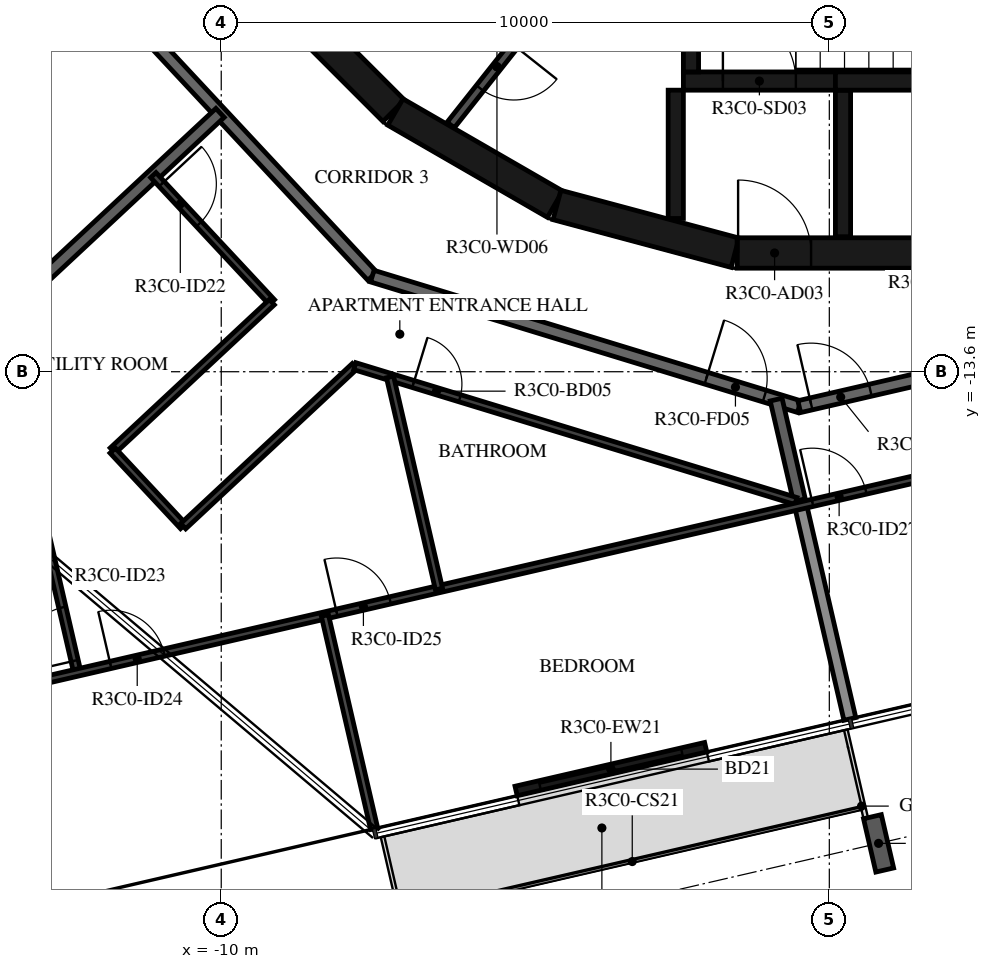
"""IFC4 building model, lengths in metres.
Left out: names, types, materials, properties, quantities, classifications, styles, units other than length and angle.
Written with IfcOpenShell. Run it as: python <this file> out.ifc"""

import sys

from ifc_helpers import new_model, si_unit, direction, frame, frame_2d, origin, origin_2d, place, context, subcontext, project, spatial, rectangle, i_section, extrude, element, fill, save


model = new_model("IFC4")
c1 = context("Model", 3, precision=1e-05, world=origin(), true_north=direction((0.0, 1.0)))
c2 = subcontext(c1, "Body", "Model", "MODEL_VIEW")
j1 = project(units=[si_unit("LENGTHUNIT", "METRE"), si_unit("PLANEANGLEUNIT", "RADIAN")], contexts=[c1])
p1 = place(None, origin())
s1 = spatial("IfcSite", under=j1, at=p1, CompositionType="ELEMENT")
p2 = place(p1, origin())
s2 = spatial("IfcBuilding", under=s1, at=p2, CompositionType="ELEMENT")
p3 = place(p2, frame((0.0, 0.0, 134.4)))
s3 = spatial("IfcBuildingStorey", under=s2, at=p3, CompositionType="ELEMENT", Elevation=134.4)
p4 = place(p3, frame((0.81, -21.356, -0.38), z_axis=(0.0, 0.0, 1.0), x_axis=(-0.974370073419, -0.224951016948, 0.0)))
e1 = element("IfcColumn", 1, at=p4, inside=s3, PredefinedType="COLUMN", context=c2, shape_type="SweptSolid", body=[
    extrude(i_section(OverallWidth=0.3, OverallDepth=0.9, WebThickness=0.019, FlangeThickness=0.035, FilletRadius=0.03, at=origin_2d()), origin(), (0.0, 0.0, 1.0), 3.5),
])
p5 = place(p3, frame((-5.151, -20.495, 0.0), z_axis=(0.0, 0.0, 1.0), x_axis=(0.974377048991, 0.224920800284, 0.0)))
e2 = element("IfcWall", 2, at=p5, inside=s3, PredefinedType="STANDARD", context=c2, shape_type="SweptSolid", body=[
    extrude(rectangle(XDim=3.2, YDim=0.16, at=frame_2d((1.6, 0.0))), origin(), (0.0, 0.0, 1.0), 3.12),
])
p6 = place(p5, frame((0.4, 0.0, 0.0)))
e3 = element("IfcOpeningElement", 3, at=p6, cuts=e2, PredefinedType="OPENING", context=c2, shape_type="SweptSolid", body=[
    extrude(rectangle(XDim=2.4, YDim=2.4, at=frame_2d((1.2, 1.2))), frame((0.0, 0.09, 0.0), z_axis=(0.0, -1.0, 0.0), x_axis=(1.0, 0.0, 0.0)), (0.0, 0.0, 1.0), 0.18),
])
p7 = place(p3, frame((-9.308, -7.164, 0.0), z_axis=(0.0, 0.0, 1.0), x_axis=(0.707106781187, -0.707106781187, 0.0)))
e4 = element("IfcWall", 4, at=p7, inside=s3, PredefinedType="SHEAR", context=c2, shape_type="SweptSolid", body=[
    extrude(rectangle(XDim=3.032, YDim=0.5, at=frame_2d((1.516, 0.0))), origin(), (0.0, 0.0, 1.0), 3.12),
])
for number, where, z_axis, x_axis in (
    (5, (-7.137, -9.329, 0.0), (0.0, 0.0, 1.0), (0.866, -0.5, 0.0)),
    (6, (-4.479, -10.858, 0.0), (0.0, 0.0, 1.0), (0.966, -0.259, 0.0)),
):
    element("IfcWall", number, at=place(p3, frame(where, z_axis=z_axis, x_axis=x_axis)), inside=s3, PredefinedType="SHEAR", context=c2, shape_type="SweptSolid", body=[
        extrude(rectangle(XDim=3.033, YDim=0.5, at=frame_2d((1.516, 0.0))), origin(), (0.0, 0.0, 1.0), 3.12),
    ])
p8 = place(p3, frame((-1.516, -11.647, 0.0), z_axis=(0.0, 0.0, 1.0), x_axis=(1.0, 0.0, 0.0)))
e7 = element("IfcWall", 7, at=p8, inside=s3, PredefinedType="SHEAR", context=c2, shape_type="SweptSolid", body=[
    extrude(rectangle(XDim=3.033, YDim=0.5, at=frame_2d((1.516, 0.0))), origin(), (0.0, 0.0, 1.0), 3.12),
])
p9 = place(p8, frame((0.016, 0.0, 0.0)))
e8 = element("IfcOpeningElement", 8, at=p9, cuts=e7, PredefinedType="OPENING", context=c2, shape_type="SweptSolid", body=[
    extrude(rectangle(XDim=1.2, YDim=2.1, at=frame_2d((0.6, 1.05))), frame((0.0, 0.26, 0.0), z_axis=(0.0, -1.0, 0.0), x_axis=(1.0, 0.0, 0.0)), (0.0, 0.0, 1.0), 0.52),
])
p10 = place(p3, frame((-2.275, -8.67, 0.0), z_axis=(0.0, 0.0, 1.0), x_axis=(0.0, 1.0, 0.0)))
e9 = element("IfcWall", 9, at=p10, inside=s3, PredefinedType="SHEAR", context=c2, shape_type="SweptSolid", body=[
    extrude(rectangle(XDim=3.32, YDim=0.25, at=frame_2d((1.66, 0.0))), origin(), (0.0, 0.0, 1.0), 3.12),
])
p11 = place(p3, frame((0.1, -8.82, 0.0), z_axis=(0.0, 0.0, 1.0), x_axis=(1.0, 0.0, 0.0)))
e10 = element("IfcWall", 10, at=p11, inside=s3, PredefinedType="SHEAR", context=c2, shape_type="SweptSolid", body=[
    extrude(rectangle(XDim=4.55, YDim=0.3, at=frame_2d((2.275, 0.0))), origin(), (0.0, 0.0, 1.0), 3.12),
])
p12 = place(p3, frame((-2.4, -8.82, 0.0), z_axis=(0.0, 0.0, 1.0), x_axis=(1.0, 0.0, 0.0)))
e11 = element("IfcWall", 11, at=p12, inside=s3, PredefinedType="SHEAR", context=c2, shape_type="SweptSolid", body=[
    extrude(rectangle(XDim=2.5, YDim=0.3, at=frame_2d((1.25, 0.0))), origin(), (0.0, 0.0, 1.0), 3.12),
])
p13 = place(p12, frame((0.65, 0.0, 0.0)))
e12 = element("IfcOpeningElement", 12, at=p13, cuts=e11, PredefinedType="OPENING", context=c2, shape_type="SweptSolid", body=[
    extrude(rectangle(XDim=1.2, YDim=2.1, at=frame_2d((0.6, 1.05))), frame((0.0, 0.16, 0.0), z_axis=(0.0, -1.0, 0.0), x_axis=(1.0, 0.0, 0.0)), (0.0, 0.0, 1.0), 0.32),
])
p14 = place(p3, frame((-2.525, -8.97, 0.0), z_axis=(0.0, 0.0, 1.0), x_axis=(0.0, -1.0, 0.0)))
e13 = element("IfcWall", 13, at=p14, inside=s3, PredefinedType="SHEAR", context=c2, shape_type="SweptSolid", body=[
    extrude(rectangle(XDim=2.11, YDim=0.25, at=frame_2d((1.055, 0.0))), origin(), (0.0, 0.0, 1.0), 3.12),
])
p15 = place(p3, frame((0.225, -8.97, 0.0), z_axis=(0.0, 0.0, 1.0), x_axis=(0.0, -1.0, 0.0)))
e14 = element("IfcWall", 14, at=p15, inside=s3, PredefinedType="SHEAR", context=c2, shape_type="SweptSolid", body=[
    extrude(rectangle(XDim=2.41, YDim=0.25, at=frame_2d((1.205, 0.0))), origin(), (0.0, 0.0, 1.0), 3.12),
])
p16 = place(p3, frame((-4.706, -7.625, 0.0), z_axis=(0.0, 0.0, 1.0), x_axis=(-0.621392599334, -0.783499353856, 0.0)))
e15 = element("IfcWall", 15, at=p16, inside=s3, PredefinedType="PARTITIONING", context=c2, shape_type="SweptSolid", body=[
    extrude(rectangle(XDim=2.447, YDim=0.15, at=frame_2d((1.224, 0.0))), origin(), (0.0, 0.0, 1.0), 3.12),
])
p17 = place(p16, frame((0.774, 0.0, 0.0)))
e16 = element("IfcOpeningElement", 16, at=p17, cuts=e15, PredefinedType="OPENING", context=c2, shape_type="SweptSolid", body=[
    extrude(rectangle(XDim=0.9, YDim=2.1, at=frame_2d((0.45, 1.05))), frame((0.0, 0.085, 0.0), z_axis=(0.0, -1.0, 0.0), x_axis=(1.0, 0.0, 0.0)), (0.0, 0.0, 1.0), 0.17),
])
p18 = place(p3, frame((-12.523, -6.659, 0.0), z_axis=(0.0, 0.0, 1.0), x_axis=(0.682001841105, -0.731350455479, 0.0)))
e17 = element("IfcWall", 17, at=p18, inside=s3, PredefinedType="STANDARD", context=c2, shape_type="SweptSolid", body=[
    extrude(rectangle(XDim=7.342, YDim=0.2, at=frame_2d((3.671, 0.0))), origin(), (0.0, 0.0, 1.0), 3.12),
])
p19 = place(p3, frame((-7.516, -12.028, 0.0), z_axis=(0.0, 0.0, 1.0), x_axis=(0.956306642771, -0.292365533182, 0.0)))
e18 = element("IfcWall", 18, at=p19, inside=s3, PredefinedType="STANDARD", context=c2, shape_type="SweptSolid", body=[
    extrude(rectangle(XDim=7.342, YDim=0.2, at=frame_2d((3.671, 0.0))), origin(), (0.0, 0.0, 1.0), 3.12),
])
p20 = place(p19, frame((5.745, 0.0, 0.0)))
e19 = element("IfcOpeningElement", 19, at=p20, cuts=e18, PredefinedType="OPENING", context=c2, shape_type="SweptSolid", body=[
    extrude(rectangle(XDim=1.0, YDim=2.1, at=frame_2d((0.5, 1.05))), frame((0.0, 0.11, 0.0), z_axis=(0.0, -1.0, 0.0), x_axis=(1.0, 0.0, 0.0)), (0.0, 0.0, 1.0), 0.22),
])
p21 = place(p3, frame((-0.495, -14.175, 0.0), z_axis=(0.0, 0.0, 1.0), x_axis=(0.974376622151, 0.224922649383, 0.0)))
e20 = element("IfcWall", 20, at=p21, inside=s3, PredefinedType="STANDARD", context=c2, shape_type="SweptSolid", body=[
    extrude(rectangle(XDim=7.342, YDim=0.2, at=frame_2d((3.671, 0.0))), origin(), (0.0, 0.0, 1.0), 3.12),
])
p22 = place(p21, frame((0.2, 0.0, 0.0)))
e21 = element("IfcOpeningElement", 21, at=p22, cuts=e20, PredefinedType="OPENING", context=c2, shape_type="SweptSolid", body=[
    extrude(rectangle(XDim=1.0, YDim=2.1, at=frame_2d((0.5, 1.05))), frame((0.0, 0.11, 0.0), z_axis=(0.0, -1.0, 0.0), x_axis=(1.0, 0.0, 0.0)), (0.0, 0.0, 1.0), 0.22),
])
p23 = place(p3, frame((-13.699, -12.774, 0.0), z_axis=(0.0, 0.0, 1.0), x_axis=(0.731353758457, 0.681998299111, 0.0)))
e22 = element("IfcWall", 22, at=p23, inside=s3, PredefinedType="STANDARD", context=c2, shape_type="SweptSolid", body=[
    extrude(rectangle(XDim=5.031, YDim=0.2, at=frame_2d((2.515, 0.0))), origin(), (0.0, 0.0, 1.0), 3.12),
])
p24 = place(p3, frame((-0.492, -15.713, 0.0), z_axis=(0.0, 0.0, 1.0), x_axis=(-0.224974992875, 0.97436453783, 0.0)))
e23 = element("IfcWall", 23, at=p24, inside=s3, PredefinedType="STANDARD", context=c2, shape_type="SweptSolid", body=[
    extrude(rectangle(XDim=1.698, YDim=0.2, at=frame_2d((0.849, 0.0))), origin(), (0.0, 0.0, 1.0), 3.12),
])
p25 = place(p3, frame((0.338, -19.31, 0.0), z_axis=(0.0, 0.0, 1.0), x_axis=(-0.224943703639, 0.9743717618, 0.0)))
e24 = element("IfcWall", 24, at=p25, inside=s3, PredefinedType="STANDARD", context=c2, shape_type="SweptSolid", body=[
    extrude(rectangle(XDim=3.6, YDim=0.2, at=frame_2d((1.8, 0.0))), origin(), (0.0, 0.0, 1.0), 2.73),
])
p26 = place(p3, frame((-11.117, -10.366, 0.0), z_axis=(0.0, 0.0, 1.0), x_axis=(0.682029016154, -0.73132511315, 0.0)))
e25 = element("IfcWall", 25, at=p26, inside=s3, PredefinedType="PARTITIONING", context=c2, shape_type="SweptSolid", body=[
    extrude(rectangle(XDim=2.858, YDim=0.12, at=frame_2d((1.429, 0.0))), origin(), (0.0, 0.0, 1.0), 3.12),
])
p27 = place(p26, frame((0.2, 0.0, 0.0)))
e26 = element("IfcOpeningElement", 26, at=p27, cuts=e25, PredefinedType="OPENING", context=c2, shape_type="SweptSolid", body=[
    extrude(rectangle(XDim=0.9, YDim=2.1, at=frame_2d((0.45, 1.05))), frame((0.0, 0.07, 0.0), z_axis=(0.0, -1.0, 0.0), x_axis=(1.0, 0.0, 0.0)), (0.0, 0.0, 1.0), 0.14),
])
p28 = place(p3, frame((-9.168, -12.456, 0.0), z_axis=(0.0, 0.0, 1.0), x_axis=(-0.731372816465, -0.681977861324, 0.0)))
e27 = element("IfcWall", 27, at=p28, inside=s3, PredefinedType="PARTITIONING", context=c2, shape_type="SweptSolid", body=[
    extrude(rectangle(XDim=3.578, YDim=0.12, at=frame_2d((1.789, 0.0))), origin(), (0.0, 0.0, 1.0), 3.12),
])
p29 = place(p3, frame((-11.785, -14.897, 0.0), z_axis=(0.0, 0.0, 1.0), x_axis=(0.681975367709, -0.73137514166, 0.0)))
e28 = element("IfcWall", 28, at=p29, inside=s3, PredefinedType="PARTITIONING", context=c2, shape_type="SweptSolid", body=[
    extrude(rectangle(XDim=1.7, YDim=0.12, at=frame_2d((0.85, 0.0))), origin(), (0.0, 0.0, 1.0), 3.12),
])
p30 = place(p3, frame((-10.625, -16.14, 0.0), z_axis=(0.0, 0.0, 1.0), x_axis=(0.73135399721, 0.68199804308, 0.0)))
e29 = element("IfcWall", 29, at=p30, inside=s3, PredefinedType="PARTITIONING", context=c2, shape_type="SweptSolid", body=[
    extrude(rectangle(XDim=3.858, YDim=0.12, at=frame_2d((1.929, 0.0))), origin(), (0.0, 0.0, 1.0), 3.12),
])
p31 = place(p3, frame((-7.804, -13.509, 0.0), z_axis=(0.0, 0.0, 1.0), x_axis=(0.956309088343, -0.292357533772, 0.0)))
e30 = element("IfcWall", 30, at=p31, inside=s3, PredefinedType="PARTITIONING", context=c2, shape_type="SweptSolid", body=[
    extrude(rectangle(XDim=7.586, YDim=0.12, at=frame_2d((3.793, 0.0))), origin(), (0.0, 0.0, 1.0), 3.12),
])
p32 = place(p31, frame((1.006, 0.0, 0.0)))
e31 = element("IfcOpeningElement", 31, at=p32, cuts=e30, PredefinedType="OPENING", context=c2, shape_type="SweptSolid", body=[
    extrude(rectangle(XDim=0.8, YDim=2.1, at=frame_2d((0.4, 1.05))), frame((0.0, 0.07, 0.0), z_axis=(0.0, -1.0, 0.0), x_axis=(1.0, 0.0, 0.0)), (0.0, 0.0, 1.0), 0.14),
])
p33 = place(p3, frame((-12.366, -18.548, 0.0), z_axis=(0.0, 0.0, 1.0), x_axis=(-0.224958805164, 0.974368275335, 0.0)))
e32 = element("IfcWall", 32, at=p33, inside=s3, PredefinedType="PARTITIONING", context=c2, shape_type="SweptSolid", body=[
    extrude(rectangle(XDim=5.926, YDim=0.12, at=frame_2d((2.963, 0.0))), origin(), (0.0, 0.0, 1.0), 3.12),
])
p34 = place(p33, frame((0.2, 0.0, 0.0)))
e33 = element("IfcOpeningElement", 33, at=p34, cuts=e32, PredefinedType="OPENING", context=c2, shape_type="SweptSolid", body=[
    extrude(rectangle(XDim=0.9, YDim=2.1, at=frame_2d((0.45, 1.05))), frame((0.0, 0.07, 0.0), z_axis=(0.0, -1.0, 0.0), x_axis=(1.0, 0.0, 0.0)), (0.0, 0.0, 1.0), 0.14),
])
p35 = place(p3, frame((-14.736, -19.095, 0.0), z_axis=(0.0, 0.0, 1.0), x_axis=(0.974368335243, 0.224958545682, 0.0)))
e34 = element("IfcWall", 34, at=p35, inside=s3, PredefinedType="PARTITIONING", context=c2, shape_type="SweptSolid", body=[
    extrude(rectangle(XDim=19.263, YDim=0.12, at=frame_2d((9.632, 0.0))), origin(), (0.0, 0.0, 1.0), 3.12),
])
p36 = place(p35, frame((2.993, 0.0, 0.0)))
e35 = element("IfcOpeningElement", 35, at=p36, cuts=e34, PredefinedType="OPENING", context=c2, shape_type="SweptSolid", body=[
    extrude(rectangle(XDim=0.9, YDim=2.1, at=frame_2d((0.45, 1.05))), frame((0.0, 0.07, 0.0), z_axis=(0.0, -1.0, 0.0), x_axis=(1.0, 0.0, 0.0)), (0.0, 0.0, 1.0), 0.14),
])
p37 = place(p35, frame((6.81, 0.0, 0.0)))
e36 = element("IfcOpeningElement", 36, at=p37, cuts=e34, PredefinedType="OPENING", context=c2, shape_type="SweptSolid", body=[
    extrude(rectangle(XDim=0.9, YDim=2.1, at=frame_2d((0.45, 1.05))), frame((0.0, 0.07, 0.0), z_axis=(0.0, -1.0, 0.0), x_axis=(1.0, 0.0, 0.0)), (0.0, 0.0, 1.0), 0.14),
])
p38 = place(p35, frame((0.2, 0.0, 0.0)))
e37 = element("IfcOpeningElement", 37, at=p38, cuts=e34, PredefinedType="OPENING", context=c2, shape_type="SweptSolid", body=[
    extrude(rectangle(XDim=0.9, YDim=2.1, at=frame_2d((0.45, 1.05))), frame((0.0, 0.07, 0.0), z_axis=(0.0, -1.0, 0.0), x_axis=(1.0, 0.0, 0.0)), (0.0, 0.0, 1.0), 0.14),
])
p39 = place(p35, frame((14.839, 0.0, 0.0)))
e38 = element("IfcOpeningElement", 38, at=p39, cuts=e34, PredefinedType="OPENING", context=c2, shape_type="SweptSolid", body=[
    extrude(rectangle(XDim=0.9, YDim=2.1, at=frame_2d((0.45, 1.05))), frame((0.0, 0.07, 0.0), z_axis=(0.0, -1.0, 0.0), x_axis=(1.0, 0.0, 0.0)), (0.0, 0.0, 1.0), 0.14),
])
p40 = place(p3, frame((-6.419, -17.175, 0.0), z_axis=(0.0, 0.0, 1.0), x_axis=(-0.224979003559, 0.974363611778, 0.0)))
e39 = element("IfcWall", 39, at=p40, inside=s3, PredefinedType="PARTITIONING", context=c2, shape_type="SweptSolid", body=[
    extrude(rectangle(XDim=3.581, YDim=0.12, at=frame_2d((1.791, 0.0))), origin(), (0.0, 0.0, 1.0), 3.12),
])
p41 = place(p3, frame((-7.486, -21.116, 0.0), z_axis=(0.0, 0.0, 1.0), x_axis=(-0.224943703639, 0.9743717618, 0.0)))
e40 = element("IfcWall", 40, at=p41, inside=s3, PredefinedType="PARTITIONING", context=c2, shape_type="SweptSolid", body=[
    extrude(rectangle(XDim=3.6, YDim=0.12, at=frame_2d((1.8, 0.0))), origin(), (0.0, 0.0, 1.0), 2.73),
])
p42 = place(p6, origin())
e41 = element("IfcDoor", 41, at=p42, inside=s3, OperationType="DOUBLE_DOOR_SLIDING", PredefinedType="DOOR", context=c2, shape_type="SweptSolid", body=[
    extrude(rectangle(XDim=2.4, YDim=2.4, at=frame_2d((1.2, 1.2))), frame((0.0, 0.025, 0.0), z_axis=(0.0, -1.0, 0.0), x_axis=(1.0, 0.0, 0.0)), (0.0, 0.0, 1.0), 0.05),
])
fill(e3, e41)
p43 = place(p13, origin())
e42 = element("IfcDoor", 42, at=p43, inside=s3, OperationType="SINGLE_SWING_LEFT", PredefinedType="DOOR", context=c2, shape_type="SweptSolid", body=[
    extrude(rectangle(XDim=1.2, YDim=2.1, at=frame_2d((0.6, 1.05))), frame((0.0, 0.025, 0.0), z_axis=(0.0, -1.0, 0.0), x_axis=(1.0, 0.0, 0.0)), (0.0, 0.0, 1.0), 0.05),
])
fill(e12, e42)
p44 = place(p9, origin())
e43 = element("IfcDoor", 43, at=p44, inside=s3, OperationType="SINGLE_SWING_RIGHT", PredefinedType="DOOR", context=c2, shape_type="SweptSolid", body=[
    extrude(rectangle(XDim=1.2, YDim=2.1, at=frame_2d((0.6, 1.05))), frame((0.0, 0.025, 0.0), z_axis=(0.0, -1.0, 0.0), x_axis=(1.0, 0.0, 0.0)), (0.0, 0.0, 1.0), 0.05),
])
fill(e8, e43)
p45 = place(p17, origin())
e44 = element("IfcDoor", 44, at=p45, inside=s3, OperationType="SINGLE_SWING_LEFT", PredefinedType="DOOR", context=c2, shape_type="SweptSolid", body=[
    extrude(rectangle(XDim=0.9, YDim=2.1, at=frame_2d((0.45, 1.05))), frame((0.0, 0.025, 0.0), z_axis=(0.0, -1.0, 0.0), x_axis=(1.0, 0.0, 0.0)), (0.0, 0.0, 1.0), 0.05),
])
fill(e16, e44)
p46 = place(p20, origin())
e45 = element("IfcDoor", 45, at=p46, inside=s3, OperationType="SINGLE_SWING_LEFT", PredefinedType="DOOR", context=c2, shape_type="SweptSolid", body=[
    extrude(rectangle(XDim=1.0, YDim=2.1, at=frame_2d((0.5, 1.05))), frame((0.0, 0.025, 0.0), z_axis=(0.0, -1.0, 0.0), x_axis=(1.0, 0.0, 0.0)), (0.0, 0.0, 1.0), 0.05),
])
fill(e19, e45)
p47 = place(p27, origin())
e46 = element("IfcDoor", 46, at=p47, inside=s3, OperationType="SINGLE_SWING_LEFT", PredefinedType="DOOR", context=c2, shape_type="SweptSolid", body=[
    extrude(rectangle(XDim=0.9, YDim=2.1, at=frame_2d((0.45, 1.05))), frame((0.0, 0.025, 0.0), z_axis=(0.0, -1.0, 0.0), x_axis=(1.0, 0.0, 0.0)), (0.0, 0.0, 1.0), 0.05),
])
fill(e26, e46)
p48 = place(p32, origin())
e47 = element("IfcDoor", 47, at=p48, inside=s3, OperationType="SINGLE_SWING_LEFT", PredefinedType="DOOR", context=c2, shape_type="SweptSolid", body=[
    extrude(rectangle(XDim=0.8, YDim=2.1, at=frame_2d((0.4, 1.05))), frame((0.0, 0.025, 0.0), z_axis=(0.0, -1.0, 0.0), x_axis=(1.0, 0.0, 0.0)), (0.0, 0.0, 1.0), 0.05),
])
fill(e31, e47)
p49 = place(p34, origin())
e48 = element("IfcDoor", 48, at=p49, inside=s3, OperationType="SINGLE_SWING_LEFT", PredefinedType="DOOR", context=c2, shape_type="SweptSolid", body=[
    extrude(rectangle(XDim=0.9, YDim=2.1, at=frame_2d((0.45, 1.05))), frame((0.0, 0.025, 0.0), z_axis=(0.0, -1.0, 0.0), x_axis=(1.0, 0.0, 0.0)), (0.0, 0.0, 1.0), 0.05),
])
fill(e33, e48)
p50 = place(p36, origin())
e49 = element("IfcDoor", 49, at=p50, inside=s3, OperationType="SINGLE_SWING_LEFT", PredefinedType="DOOR", context=c2, shape_type="SweptSolid", body=[
    extrude(rectangle(XDim=0.9, YDim=2.1, at=frame_2d((0.45, 1.05))), frame((0.0, 0.025, 0.0), z_axis=(0.0, -1.0, 0.0), x_axis=(1.0, 0.0, 0.0)), (0.0, 0.0, 1.0), 0.05),
])
fill(e35, e49)
p51 = place(p37, origin())
e50 = element("IfcDoor", 50, at=p51, inside=s3, OperationType="SINGLE_SWING_LEFT", PredefinedType="DOOR", context=c2, shape_type="SweptSolid", body=[
    extrude(rectangle(XDim=0.9, YDim=2.1, at=frame_2d((0.45, 1.05))), frame((0.0, 0.025, 0.0), z_axis=(0.0, -1.0, 0.0), x_axis=(1.0, 0.0, 0.0)), (0.0, 0.0, 1.0), 0.05),
])
fill(e36, e50)
p52 = place(p22, origin())
e51 = element("IfcDoor", 51, at=p52, inside=s3, OperationType="SINGLE_SWING_LEFT", PredefinedType="DOOR", context=c2, shape_type="SweptSolid", body=[
    extrude(rectangle(XDim=1.0, YDim=2.1, at=frame_2d((0.5, 1.05))), frame((0.0, 0.025, 0.0), z_axis=(0.0, -1.0, 0.0), x_axis=(1.0, 0.0, 0.0)), (0.0, 0.0, 1.0), 0.05),
])
fill(e21, e51)
p53 = place(p39, origin())
e52 = element("IfcDoor", 52, at=p53, inside=s3, OperationType="SINGLE_SWING_LEFT", PredefinedType="DOOR", context=c2, shape_type="SweptSolid", body=[
    extrude(rectangle(XDim=0.9, YDim=2.1, at=frame_2d((0.45, 1.05))), frame((0.0, 0.025, 0.0), z_axis=(0.0, -1.0, 0.0), x_axis=(1.0, 0.0, 0.0)), (0.0, 0.0, 1.0), 0.05),
])
fill(e38, e52)
save(model, sys.argv[1])
